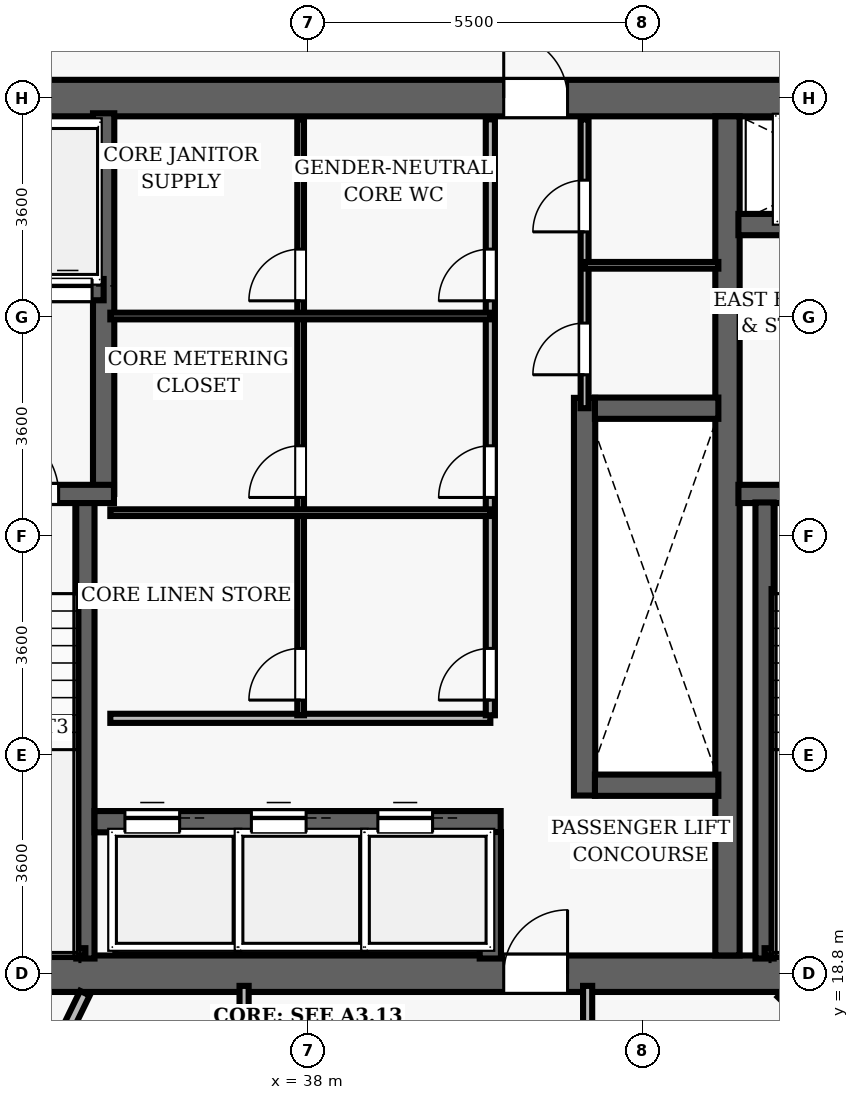
"""IFC4 building model, lengths in metres.
Left out: names, types, materials, properties, quantities, classifications, styles, units other than length and angle.
Written with IfcOpenShell. Run it as: python <this file> out.ifc"""

import sys

from ifc_helpers import new_model, si_unit, direction, frame, frame_2d, origin, place, context, subcontext, project, spatial, rectangle, extrude, element, fill, save


model = new_model("IFC4")
c1 = context("Model", 3, precision=1e-05, world=origin(), true_north=direction((0.0, 1.0)))
c2 = subcontext(c1, "Body", "Model", "MODEL_VIEW")
j1 = project(units=[si_unit("LENGTHUNIT", "METRE"), si_unit("PLANEANGLEUNIT", "RADIAN")], contexts=[c1])
p1 = place(None, origin())
s1 = spatial("IfcSite", under=j1, at=p1, CompositionType="ELEMENT")
p2 = place(p1, origin())
s2 = spatial("IfcBuilding", under=s1, at=p2, CompositionType="ELEMENT")
p3 = place(p2, frame((0.0, 0.0, 151.8)))
s3 = spatial("IfcBuildingStorey", under=s2, at=p3, CompositionType="ELEMENT", Elevation=151.8)
p4 = place(p3, frame((26.7, 18.8, 0.0), z_axis=(0.0, 0.0, 1.0), x_axis=(1.0, 0.0, 0.0)))
e1 = element("IfcWall", 1, at=p4, inside=s3, PredefinedType="SHEAR", context=c2, shape_type="SweptSolid", body=[
    extrude(rectangle(XDim=22.6, YDim=0.6, at=frame_2d((11.3, 0.0))), origin(), (0.0, 0.0, 1.0), 3.5),
])
p5 = place(p4, frame((14.52, 0.0, 0.0)))
e2 = element("IfcOpeningElement", 2, at=p5, cuts=e1, PredefinedType="OPENING", context=c2, shape_type="SweptSolid", body=[
    extrude(rectangle(XDim=1.05, YDim=2.15, at=frame_2d((0.525, 1.075))), frame((0.0, 0.31, 0.0), z_axis=(0.0, -1.0, 0.0), x_axis=(1.0, 0.0, 0.0)), (0.0, 0.0, 1.0), 0.62),
])
p6 = place(p3, frame((26.7, 33.2, 0.0), z_axis=(0.0, 0.0, 1.0), x_axis=(1.0, 0.0, 0.0)))
e3 = element("IfcWall", 3, at=p6, inside=s3, PredefinedType="SHEAR", context=c2, shape_type="SweptSolid", body=[
    extrude(rectangle(XDim=22.6, YDim=0.6, at=frame_2d((11.3, 0.0))), origin(), (0.0, 0.0, 1.0), 3.5),
])
p7 = place(p6, frame((4.62, 0.0, 0.0)))
e4 = element("IfcOpeningElement", 4, at=p7, cuts=e3, PredefinedType="OPENING", context=c2, shape_type="SweptSolid", body=[
    extrude(rectangle(XDim=1.05, YDim=2.15, at=frame_2d((0.525, 1.075))), frame((0.0, 0.31, 0.0), z_axis=(0.0, -1.0, 0.0), x_axis=(1.0, 0.0, 0.0)), (0.0, 0.0, 1.0), 0.62),
])
p8 = place(p6, frame((14.52, 0.0, 0.0)))
e5 = element("IfcOpeningElement", 5, at=p8, cuts=e3, PredefinedType="OPENING", context=c2, shape_type="SweptSolid", body=[
    extrude(rectangle(XDim=1.05, YDim=2.15, at=frame_2d((0.525, 1.075))), frame((0.0, 0.31, 0.0), z_axis=(0.0, -1.0, 0.0), x_axis=(1.0, 0.0, 0.0)), (0.0, 0.0, 1.0), 0.62),
])
p9 = place(p3, frame((44.9, 19.1, 0.0), z_axis=(0.0, 0.0, 1.0), x_axis=(0.0, 1.0, 0.0)))
e6 = element("IfcWall", 6, at=p9, inside=s3, PredefinedType="SHEAR", context=c2, shape_type="SweptSolid", body=[
    extrude(rectangle(XDim=13.8, YDim=0.4, at=frame_2d((6.9, 0.0))), origin(), (0.0, 0.0, 1.0), 3.5),
])
p10 = place(p3, frame((45.08, 26.69, 0.0), z_axis=(0.0, 0.0, 1.0), x_axis=(1.0, 0.0, 0.0)))
e7 = element("IfcWall", 7, at=p10, inside=s3, PredefinedType="SHEAR", context=c2, shape_type="SweptSolid", body=[
    extrude(rectangle(XDim=3.67, YDim=0.3, at=frame_2d((1.835, 0.0))), origin(), (0.0, 0.0, 1.0), 3.5),
])
p11 = place(p10, frame((1.05, 0.0, 0.0)))
e8 = element("IfcOpeningElement", 8, at=p11, cuts=e7, PredefinedType="OPENING", context=c2, shape_type="SweptSolid", body=[
    extrude(rectangle(XDim=1.1, YDim=2.15, at=frame_2d((0.55, 1.075))), frame((0.0, 0.16, 0.0), z_axis=(0.0, -1.0, 0.0), x_axis=(1.0, 0.0, 0.0)), (0.0, 0.0, 1.0), 0.32),
])
p12 = place(p3, frame((45.51, 19.05, 0.0), z_axis=(0.0, 0.0, 1.0), x_axis=(0.0, 1.0, 0.0)))
e9 = element("IfcWall", 9, at=p12, inside=s3, PredefinedType="SHEAR", context=c2, shape_type="SweptSolid", body=[
    extrude(rectangle(XDim=7.5, YDim=0.3, at=frame_2d((3.75, 0.0))), origin(), (0.0, 0.0, 1.0), 3.5),
])
p13 = place(p3, frame((45.51, 19.16, 0.0), z_axis=(0.0, 0.0, 1.0), x_axis=(1.0, 0.0, 0.0)))
e10 = element("IfcWall", 10, at=p13, inside=s3, PredefinedType="SHEAR", context=c2, shape_type="SweptSolid", body=[
    extrude(rectangle(XDim=3.095, YDim=0.12, at=frame_2d((1.547, 0.0))), origin(), (0.0, 0.0, 1.0), 3.5),
])
p14 = place(p3, frame((45.08, 31.12, 0.0), z_axis=(0.0, 0.0, 1.0), x_axis=(1.0, 0.0, 0.0)))
e11 = element("IfcWall", 11, at=p14, inside=s3, PredefinedType="SHEAR", context=c2, shape_type="SweptSolid", body=[
    extrude(rectangle(XDim=3.67, YDim=0.35, at=frame_2d((1.835, 0.0))), origin(), (0.0, 0.0, 1.0), 2.675),
])
p15 = place(p14, frame((1.25, 0.0, 0.0)))
e12 = element("IfcOpeningElement", 12, at=p15, cuts=e11, PredefinedType="OPENING", context=c2, shape_type="SweptSolid", body=[
    extrude(rectangle(XDim=1.1, YDim=2.15, at=frame_2d((0.55, 1.075))), frame((0.0, 0.185, 0.0), z_axis=(0.0, -1.0, 0.0), x_axis=(1.0, 0.0, 0.0)), (0.0, 0.0, 1.0), 0.37),
])
p16 = place(p3, frame((34.34, 19.05, 0.0), z_axis=(0.0, 0.0, 1.0), x_axis=(0.0, 1.0, 0.0)))
e13 = element("IfcWall", 13, at=p16, inside=s3, PredefinedType="SHEAR", context=c2, shape_type="SweptSolid", body=[
    extrude(rectangle(XDim=7.5, YDim=0.3, at=frame_2d((3.75, 0.0))), origin(), (0.0, 0.0, 1.0), 3.5),
])
p17 = place(p3, frame((34.64, 26.69, 0.0), z_axis=(0.0, 0.0, 1.0), x_axis=(0.0, 1.0, 0.0)))
e14 = element("IfcWall", 14, at=p17, inside=s3, PredefinedType="SHEAR", context=c2, shape_type="SweptSolid", body=[
    extrude(rectangle(XDim=6.26, YDim=0.35, at=frame_2d((3.13, 0.0))), origin(), (0.0, 0.0, 1.0), 3.5),
])
p18 = place(p3, frame((31.25, 26.69, 0.0), z_axis=(0.0, 0.0, 1.0), x_axis=(1.0, 0.0, 0.0)))
e15 = element("IfcWall", 15, at=p18, inside=s3, PredefinedType="SHEAR", context=c2, shape_type="SweptSolid", body=[
    extrude(rectangle(XDim=3.56, YDim=0.3, at=frame_2d((1.78, 0.0))), origin(), (0.0, 0.0, 1.0), 3.5),
])
p19 = place(p18, frame((1.55, 0.0, 0.0)))
e16 = element("IfcOpeningElement", 16, at=p19, cuts=e15, PredefinedType="OPENING", context=c2, shape_type="SweptSolid", body=[
    extrude(rectangle(XDim=1.1, YDim=2.15, at=frame_2d((0.55, 1.075))), frame((0.0, 0.16, 0.0), z_axis=(0.0, -1.0, 0.0), x_axis=(1.0, 0.0, 0.0)), (0.0, 0.0, 1.0), 0.32),
])
p20 = place(p3, frame((31.3, 19.16, 0.0), z_axis=(0.0, 0.0, 1.0), x_axis=(1.0, 0.0, 0.0)))
e17 = element("IfcWall", 17, at=p20, inside=s3, PredefinedType="SHEAR", context=c2, shape_type="SweptSolid", body=[
    extrude(rectangle(XDim=3.04, YDim=0.12, at=frame_2d((1.52, 0.0))), origin(), (0.0, 0.0, 1.0), 3.5),
])
p21 = place(p3, frame((32.23, 30.05, 0.0), z_axis=(0.0, 0.0, 1.0), x_axis=(1.0, 0.0, 0.0)))
e18 = element("IfcWall", 18, at=p21, inside=s3, PredefinedType="SHEAR", context=c2, shape_type="SweptSolid", body=[
    extrude(rectangle(XDim=2.41, YDim=0.35, at=frame_2d((1.205, 0.0))), origin(), (0.0, 0.0, 1.0), 2.675),
])
p22 = place(p21, frame((0.42, 0.0, 0.0)))
e19 = element("IfcOpeningElement", 19, at=p22, cuts=e18, PredefinedType="OPENING", context=c2, shape_type="SweptSolid", body=[
    extrude(rectangle(XDim=0.8, YDim=2.15, at=frame_2d((0.4, 1.075))), frame((0.0, 0.185, 0.0), z_axis=(0.0, -1.0, 0.0), x_axis=(1.0, 0.0, 0.0)), (0.0, 0.0, 1.0), 0.37),
])
p23 = place(p21, frame((1.42, 0.0, 0.0)))
e20 = element("IfcOpeningElement", 20, at=p23, cuts=e18, PredefinedType="OPENING", context=c2, shape_type="SweptSolid", body=[
    extrude(rectangle(XDim=0.8, YDim=2.15, at=frame_2d((0.4, 1.075))), frame((0.0, 0.185, 0.0), z_axis=(0.0, -1.0, 0.0), x_axis=(1.0, 0.0, 0.0)), (0.0, 0.0, 1.0), 0.37),
])
p24 = place(p3, frame((42.55, 21.73, 0.0), z_axis=(0.0, 0.0, 1.0), x_axis=(0.0, 1.0, 0.0)))
e21 = element("IfcWall", 21, at=p24, inside=s3, PredefinedType="SHEAR", context=c2, shape_type="SweptSolid", body=[
    extrude(rectangle(XDim=6.54, YDim=0.35, at=frame_2d((3.27, 0.0))), origin(), (0.0, 0.0, 1.0), 2.675),
])
for number, where, z_axis, x_axis in (
    (22, (42.72, 21.9, 0.0), (0.0, 0.0, 1.0), (1.0, 0.0, 0.0)),
    (23, (42.72, 28.1, 0.0), (0.0, 0.0, 1.0), (1.0, 0.0, 0.0)),
):
    element("IfcWall", number, at=place(p3, frame(where, z_axis=z_axis, x_axis=x_axis)), inside=s3, PredefinedType="SHEAR", context=c2, shape_type="SweptSolid", body=[
        extrude(rectangle(XDim=2.03, YDim=0.35, at=frame_2d((1.015, 0.0))), origin(), (0.0, 0.0, 1.0), 2.675),
    ])
p25 = place(p3, frame((34.49, 21.3, 0.0), z_axis=(0.0, 0.0, 1.0), x_axis=(1.0, 0.0, 0.0)))
e24 = element("IfcWall", 24, at=p25, inside=s3, PredefinedType="SHEAR", context=c2, shape_type="SweptSolid", body=[
    extrude(rectangle(XDim=6.68, YDim=0.35, at=frame_2d((3.34, 0.0))), origin(), (0.0, 0.0, 1.0), 2.675),
])
p26 = place(p25, frame((0.5, 0.0, 0.0)))
e25 = element("IfcOpeningElement", 25, at=p26, cuts=e24, PredefinedType="OPENING", context=c2, shape_type="SweptSolid", body=[
    extrude(rectangle(XDim=0.9, YDim=2.15, at=frame_2d((0.45, 1.075))), frame((0.0, 0.185, 0.0), z_axis=(0.0, -1.0, 0.0), x_axis=(1.0, 0.0, 0.0)), (0.0, 0.0, 1.0), 0.37),
])
p27 = place(p25, frame((2.58, 0.0, 0.0)))
e26 = element("IfcOpeningElement", 26, at=p27, cuts=e24, PredefinedType="OPENING", context=c2, shape_type="SweptSolid", body=[
    extrude(rectangle(XDim=0.9, YDim=2.15, at=frame_2d((0.45, 1.075))), frame((0.0, 0.185, 0.0), z_axis=(0.0, -1.0, 0.0), x_axis=(1.0, 0.0, 0.0)), (0.0, 0.0, 1.0), 0.37),
])
p28 = place(p25, frame((4.66, 0.0, 0.0)))
e27 = element("IfcOpeningElement", 27, at=p28, cuts=e24, PredefinedType="OPENING", context=c2, shape_type="SweptSolid", body=[
    extrude(rectangle(XDim=0.9, YDim=2.15, at=frame_2d((0.45, 1.075))), frame((0.0, 0.185, 0.0), z_axis=(0.0, -1.0, 0.0), x_axis=(1.0, 0.0, 0.0)), (0.0, 0.0, 1.0), 0.37),
])
p29 = place(p3, frame((41.0, 19.05, 0.0), z_axis=(0.0, 0.0, 1.0), x_axis=(0.0, 1.0, 0.0)))
e28 = element("IfcWall", 28, at=p29, inside=s3, PredefinedType="SHEAR", context=c2, shape_type="SweptSolid", body=[
    extrude(rectangle(XDim=2.08, YDim=0.35, at=frame_2d((1.04, 0.0))), origin(), (0.0, 0.0, 1.0), 2.675),
])
p30 = place(p3, frame((34.75, 23.0, 0.0), z_axis=(0.0, 0.0, 1.0), x_axis=(1.0, 0.0, 0.0)))
e29 = element("IfcWall", 29, at=p30, inside=s3, PredefinedType="PARTITIONING", context=c2, shape_type="SweptSolid", body=[
    extrude(rectangle(XDim=6.25, YDim=0.15, at=frame_2d((3.125, 0.0))), origin(), (0.0, 0.0, 1.0), 2.675),
])
p31 = place(p3, frame((41.0, 23.05, 0.0), z_axis=(0.0, 0.0, 1.0), x_axis=(0.0, 1.0, 0.0)))
e30 = element("IfcWall", 30, at=p31, inside=s3, PredefinedType="PARTITIONING", context=c2, shape_type="SweptSolid", body=[
    extrude(rectangle(XDim=9.8, YDim=0.15, at=frame_2d((4.9, 0.0))), origin(), (0.0, 0.0, 1.0), 2.675),
])
p32 = place(p31, frame((0.25, 0.0, 0.0)))
e31 = element("IfcOpeningElement", 31, at=p32, cuts=e30, PredefinedType="OPENING", context=c2, shape_type="SweptSolid", body=[
    extrude(rectangle(XDim=0.85, YDim=2.1, at=frame_2d((0.425, 1.05))), frame((0.0, 0.085, 0.0), z_axis=(0.0, -1.0, 0.0), x_axis=(1.0, 0.0, 0.0)), (0.0, 0.0, 1.0), 0.17),
])
p33 = place(p31, frame((3.582, 0.0, 0.0)))
e32 = element("IfcOpeningElement", 32, at=p33, cuts=e30, PredefinedType="OPENING", context=c2, shape_type="SweptSolid", body=[
    extrude(rectangle(XDim=0.85, YDim=2.1, at=frame_2d((0.425, 1.05))), frame((0.0, 0.085, 0.0), z_axis=(0.0, -1.0, 0.0), x_axis=(1.0, 0.0, 0.0)), (0.0, 0.0, 1.0), 0.17),
])
p34 = place(p31, frame((6.816, 0.0, 0.0)))
e33 = element("IfcOpeningElement", 33, at=p34, cuts=e30, PredefinedType="OPENING", context=c2, shape_type="SweptSolid", body=[
    extrude(rectangle(XDim=0.85, YDim=2.1, at=frame_2d((0.425, 1.05))), frame((0.0, 0.085, 0.0), z_axis=(0.0, -1.0, 0.0), x_axis=(1.0, 0.0, 0.0)), (0.0, 0.0, 1.0), 0.17),
])
p35 = place(p3, frame((37.88, 23.05, 0.0), z_axis=(0.0, 0.0, 1.0), x_axis=(0.0, 1.0, 0.0)))
e34 = element("IfcWall", 34, at=p35, inside=s3, PredefinedType="PARTITIONING", context=c2, shape_type="SweptSolid", body=[
    extrude(rectangle(XDim=9.8, YDim=0.11, at=frame_2d((4.9, 0.0))), origin(), (0.0, 0.0, 1.0), 2.675),
])
p36 = place(p35, frame((0.25, 0.0, 0.0)))
e35 = element("IfcOpeningElement", 35, at=p36, cuts=e34, PredefinedType="OPENING", context=c2, shape_type="SweptSolid", body=[
    extrude(rectangle(XDim=0.85, YDim=2.1, at=frame_2d((0.425, 1.05))), frame((0.0, 0.065, 0.0), z_axis=(0.0, -1.0, 0.0), x_axis=(1.0, 0.0, 0.0)), (0.0, 0.0, 1.0), 0.13),
])
p37 = place(p35, frame((3.582, 0.0, 0.0)))
e36 = element("IfcOpeningElement", 36, at=p37, cuts=e34, PredefinedType="OPENING", context=c2, shape_type="SweptSolid", body=[
    extrude(rectangle(XDim=0.85, YDim=2.1, at=frame_2d((0.425, 1.05))), frame((0.0, 0.065, 0.0), z_axis=(0.0, -1.0, 0.0), x_axis=(1.0, 0.0, 0.0)), (0.0, 0.0, 1.0), 0.13),
])
p38 = place(p35, frame((6.816, 0.0, 0.0)))
e37 = element("IfcOpeningElement", 37, at=p38, cuts=e34, PredefinedType="OPENING", context=c2, shape_type="SweptSolid", body=[
    extrude(rectangle(XDim=0.85, YDim=2.1, at=frame_2d((0.425, 1.05))), frame((0.0, 0.065, 0.0), z_axis=(0.0, -1.0, 0.0), x_axis=(1.0, 0.0, 0.0)), (0.0, 0.0, 1.0), 0.13),
])
for number, where, z_axis, x_axis in (
    (38, (34.75, 26.382, 0.0), (0.0, 0.0, 1.0), (1.0, 0.0, 0.0)),
    (39, (34.75, 29.616, 0.0), (0.0, 0.0, 1.0), (1.0, 0.0, 0.0)),
):
    element("IfcWall", number, at=place(p3, frame(where, z_axis=z_axis, x_axis=x_axis)), inside=s3, PredefinedType="PARTITIONING", context=c2, shape_type="SweptSolid", body=[
        extrude(rectangle(XDim=6.25, YDim=0.11, at=frame_2d((3.125, 0.0))), origin(), (0.0, 0.0, 1.0), 2.675),
    ])
p39 = place(p3, frame((42.55, 28.1, 0.0), z_axis=(0.0, 0.0, 1.0), x_axis=(0.0, 1.0, 0.0)))
e40 = element("IfcWall", 40, at=p39, inside=s3, PredefinedType="PARTITIONING", context=c2, shape_type="SweptSolid", body=[
    extrude(rectangle(XDim=4.75, YDim=0.13, at=frame_2d((2.375, 0.0))), origin(), (0.0, 0.0, 1.0), 2.675),
])
p40 = place(p39, frame((0.55, 0.0, 0.0)))
e41 = element("IfcOpeningElement", 41, at=p40, cuts=e40, PredefinedType="OPENING", context=c2, shape_type="SweptSolid", body=[
    extrude(rectangle(XDim=0.85, YDim=2.1, at=frame_2d((0.425, 1.05))), frame((0.0, 0.075, 0.0), z_axis=(0.0, -1.0, 0.0), x_axis=(1.0, 0.0, 0.0)), (0.0, 0.0, 1.0), 0.15),
])
p41 = place(p39, frame((2.9, 0.0, 0.0)))
e42 = element("IfcOpeningElement", 42, at=p41, cuts=e40, PredefinedType="OPENING", context=c2, shape_type="SweptSolid", body=[
    extrude(rectangle(XDim=0.85, YDim=2.1, at=frame_2d((0.425, 1.05))), frame((0.0, 0.075, 0.0), z_axis=(0.0, -1.0, 0.0), x_axis=(1.0, 0.0, 0.0)), (0.0, 0.0, 1.0), 0.15),
])
p42 = place(p3, frame((42.55, 30.45, 0.0), z_axis=(0.0, 0.0, 1.0), x_axis=(1.0, 0.0, 0.0)))
e43 = element("IfcWall", 43, at=p42, inside=s3, PredefinedType="PARTITIONING", context=c2, shape_type="SweptSolid", body=[
    extrude(rectangle(XDim=2.2, YDim=0.11, at=frame_2d((1.1, 0.0))), origin(), (0.0, 0.0, 1.0), 2.675),
])
p43 = place(p3, frame((36.95, 11.2, 0.0), z_axis=(0.0, 0.0, 1.0), x_axis=(0.0, 1.0, 0.0)))
e44 = element("IfcWall", 44, at=p43, inside=s3, PredefinedType="PARTITIONING", context=c2, shape_type="SweptSolid", body=[
    extrude(rectangle(XDim=7.4, YDim=0.15, at=frame_2d((3.7, 0.0))), origin(), (0.0, 0.0, 1.0), 2.675),
])
p44 = place(p43, frame((5.075, 0.0, 0.0)))
e45 = element("IfcOpeningElement", 45, at=p44, cuts=e44, PredefinedType="OPENING", context=c2, shape_type="SweptSolid", body=[
    extrude(rectangle(XDim=0.95, YDim=2.15, at=frame_2d((0.475, 1.075))), frame((0.0, 0.085, 0.0), z_axis=(0.0, -1.0, 0.0), x_axis=(1.0, 0.0, 0.0)), (0.0, 0.0, 1.0), 0.17),
])
p45 = place(p3, frame((42.6, 16.65, 0.0), z_axis=(0.0, 0.0, 1.0), x_axis=(0.0, 1.0, 0.0)))
e46 = element("IfcWall", 46, at=p45, inside=s3, PredefinedType="PARTITIONING", context=c2, shape_type="SweptSolid", body=[
    extrude(rectangle(XDim=1.95, YDim=0.15, at=frame_2d((0.975, 0.0))), origin(), (0.0, 0.0, 1.0), 2.675),
])
p46 = place(p3, frame((34.332, 18.48, 0.0), z_axis=(0.0, 0.0, 1.0), x_axis=(-0.43836706514, -0.898796037041, 0.0)))
e47 = element("IfcWall", 47, at=p46, inside=s3, PredefinedType="PARTITIONING", context=c2, shape_type="SweptSolid", body=[
    extrude(rectangle(XDim=14.541, YDim=0.175, at=frame_2d((7.271, 0.0))), origin(), (0.0, 0.0, 1.0), 2.675),
])
p47 = place(p3, frame((45.787, 18.48, 0.0), z_axis=(0.0, 0.0, 1.0), x_axis=(0.719344241766, -0.694653771197, 0.0)))
e48 = element("IfcWall", 48, at=p47, inside=s3, PredefinedType="PARTITIONING", context=c2, shape_type="SweptSolid", body=[
    extrude(rectangle(XDim=16.543, YDim=0.175, at=frame_2d((8.271, 0.0))), origin(), (0.0, 0.0, 1.0), 2.675),
])
p48 = place(p19, origin())
e49 = element("IfcDoor", 49, at=p48, inside=s3, OperationType="SINGLE_SWING_LEFT", PredefinedType="DOOR", context=c2, shape_type="SweptSolid", body=[
    extrude(rectangle(XDim=1.1, YDim=2.15, at=frame_2d((0.55, 1.075))), frame((0.0, 0.025, 0.0), z_axis=(0.0, -1.0, 0.0), x_axis=(1.0, 0.0, 0.0)), (0.0, 0.0, 1.0), 0.05),
])
fill(e16, e49)
p49 = place(p8, origin())
e50 = element("IfcDoor", 50, at=p49, inside=s3, OperationType="SINGLE_SWING_LEFT", PredefinedType="DOOR", context=c2, shape_type="SweptSolid", body=[
    extrude(rectangle(XDim=1.05, YDim=2.15, at=frame_2d((0.525, 1.075))), frame((0.0, 0.025, 0.0), z_axis=(0.0, -1.0, 0.0), x_axis=(1.0, 0.0, 0.0)), (0.0, 0.0, 1.0), 0.05),
])
fill(e5, e50)
p50 = place(p5, origin())
e51 = element("IfcDoor", 51, at=p50, inside=s3, OperationType="SINGLE_SWING_RIGHT", PredefinedType="DOOR", context=c2, shape_type="SweptSolid", body=[
    extrude(rectangle(XDim=1.05, YDim=2.15, at=frame_2d((0.525, 1.075))), frame((0.0, 0.025, 0.0), z_axis=(0.0, -1.0, 0.0), x_axis=(1.0, 0.0, 0.0)), (0.0, 0.0, 1.0), 0.05),
])
fill(e2, e51)
p51 = place(p32, origin())
e52 = element("IfcDoor", 52, at=p51, inside=s3, OperationType="SINGLE_SWING_LEFT", PredefinedType="DOOR", context=c2, shape_type="SweptSolid", body=[
    extrude(rectangle(XDim=0.85, YDim=2.1, at=frame_2d((0.425, 1.05))), frame((0.0, 0.025, 0.0), z_axis=(0.0, -1.0, 0.0), x_axis=(1.0, 0.0, 0.0)), (0.0, 0.0, 1.0), 0.05),
])
fill(e31, e52)
p52 = place(p36, origin())
e53 = element("IfcDoor", 53, at=p52, inside=s3, OperationType="SINGLE_SWING_LEFT", PredefinedType="DOOR", context=c2, shape_type="SweptSolid", body=[
    extrude(rectangle(XDim=0.85, YDim=2.1, at=frame_2d((0.425, 1.05))), frame((0.0, 0.025, 0.0), z_axis=(0.0, -1.0, 0.0), x_axis=(1.0, 0.0, 0.0)), (0.0, 0.0, 1.0), 0.05),
])
fill(e35, e53)
p53 = place(p33, origin())
e54 = element("IfcDoor", 54, at=p53, inside=s3, OperationType="SINGLE_SWING_LEFT", PredefinedType="DOOR", context=c2, shape_type="SweptSolid", body=[
    extrude(rectangle(XDim=0.85, YDim=2.1, at=frame_2d((0.425, 1.05))), frame((0.0, 0.025, 0.0), z_axis=(0.0, -1.0, 0.0), x_axis=(1.0, 0.0, 0.0)), (0.0, 0.0, 1.0), 0.05),
])
fill(e32, e54)
p54 = place(p37, origin())
e55 = element("IfcDoor", 55, at=p54, inside=s3, OperationType="SINGLE_SWING_LEFT", PredefinedType="DOOR", context=c2, shape_type="SweptSolid", body=[
    extrude(rectangle(XDim=0.85, YDim=2.1, at=frame_2d((0.425, 1.05))), frame((0.0, 0.025, 0.0), z_axis=(0.0, -1.0, 0.0), x_axis=(1.0, 0.0, 0.0)), (0.0, 0.0, 1.0), 0.05),
])
fill(e36, e55)
p55 = place(p34, origin())
e56 = element("IfcDoor", 56, at=p55, inside=s3, OperationType="SINGLE_SWING_LEFT", PredefinedType="DOOR", context=c2, shape_type="SweptSolid", body=[
    extrude(rectangle(XDim=0.85, YDim=2.1, at=frame_2d((0.425, 1.05))), frame((0.0, 0.025, 0.0), z_axis=(0.0, -1.0, 0.0), x_axis=(1.0, 0.0, 0.0)), (0.0, 0.0, 1.0), 0.05),
])
fill(e33, e56)
p56 = place(p38, origin())
e57 = element("IfcDoor", 57, at=p56, inside=s3, OperationType="SINGLE_SWING_LEFT", PredefinedType="DOOR", context=c2, shape_type="SweptSolid", body=[
    extrude(rectangle(XDim=0.85, YDim=2.1, at=frame_2d((0.425, 1.05))), frame((0.0, 0.025, 0.0), z_axis=(0.0, -1.0, 0.0), x_axis=(1.0, 0.0, 0.0)), (0.0, 0.0, 1.0), 0.05),
])
fill(e37, e57)
p57 = place(p40, origin())
e58 = element("IfcDoor", 58, at=p57, inside=s3, OperationType="SINGLE_SWING_LEFT", PredefinedType="DOOR", context=c2, shape_type="SweptSolid", body=[
    extrude(rectangle(XDim=0.85, YDim=2.1, at=frame_2d((0.425, 1.05))), frame((0.0, 0.025, 0.0), z_axis=(0.0, -1.0, 0.0), x_axis=(1.0, 0.0, 0.0)), (0.0, 0.0, 1.0), 0.05),
])
fill(e41, e58)
p58 = place(p41, origin())
e59 = element("IfcDoor", 59, at=p58, inside=s3, OperationType="SINGLE_SWING_LEFT", PredefinedType="DOOR", context=c2, shape_type="SweptSolid", body=[
    extrude(rectangle(XDim=0.85, YDim=2.1, at=frame_2d((0.425, 1.05))), frame((0.0, 0.025, 0.0), z_axis=(0.0, -1.0, 0.0), x_axis=(1.0, 0.0, 0.0)), (0.0, 0.0, 1.0), 0.05),
])
fill(e42, e59)
p59 = place(p26, origin())
e60 = element("IfcDoor", 60, at=p59, inside=s3, OperationType="SLIDING_TO_LEFT", PredefinedType="DOOR", context=c2, shape_type="SweptSolid", body=[
    extrude(rectangle(XDim=0.9, YDim=2.15, at=frame_2d((0.45, 1.075))), frame((0.0, 0.025, 0.0), z_axis=(0.0, -1.0, 0.0), x_axis=(1.0, 0.0, 0.0)), (0.0, 0.0, 1.0), 0.05),
])
fill(e25, e60)
p60 = place(p27, origin())
e61 = element("IfcDoor", 61, at=p60, inside=s3, OperationType="SLIDING_TO_LEFT", PredefinedType="DOOR", context=c2, shape_type="SweptSolid", body=[
    extrude(rectangle(XDim=0.9, YDim=2.15, at=frame_2d((0.45, 1.075))), frame((0.0, 0.025, 0.0), z_axis=(0.0, -1.0, 0.0), x_axis=(1.0, 0.0, 0.0)), (0.0, 0.0, 1.0), 0.05),
])
fill(e26, e61)
p61 = place(p28, origin())
e62 = element("IfcDoor", 62, at=p61, inside=s3, OperationType="SLIDING_TO_LEFT", PredefinedType="DOOR", context=c2, shape_type="SweptSolid", body=[
    extrude(rectangle(XDim=0.9, YDim=2.15, at=frame_2d((0.45, 1.075))), frame((0.0, 0.025, 0.0), z_axis=(0.0, -1.0, 0.0), x_axis=(1.0, 0.0, 0.0)), (0.0, 0.0, 1.0), 0.05),
])
fill(e27, e62)
p62 = place(p23, origin())
e63 = element("IfcDoor", 63, at=p62, inside=s3, OperationType="SLIDING_TO_LEFT", PredefinedType="DOOR", context=c2, shape_type="SweptSolid", body=[
    extrude(rectangle(XDim=0.8, YDim=2.15, at=frame_2d((0.4, 1.075))), frame((0.0, 0.025, 0.0), z_axis=(0.0, -1.0, 0.0), x_axis=(1.0, 0.0, 0.0)), (0.0, 0.0, 1.0), 0.05),
])
fill(e20, e63)
save(model, sys.argv[1])
